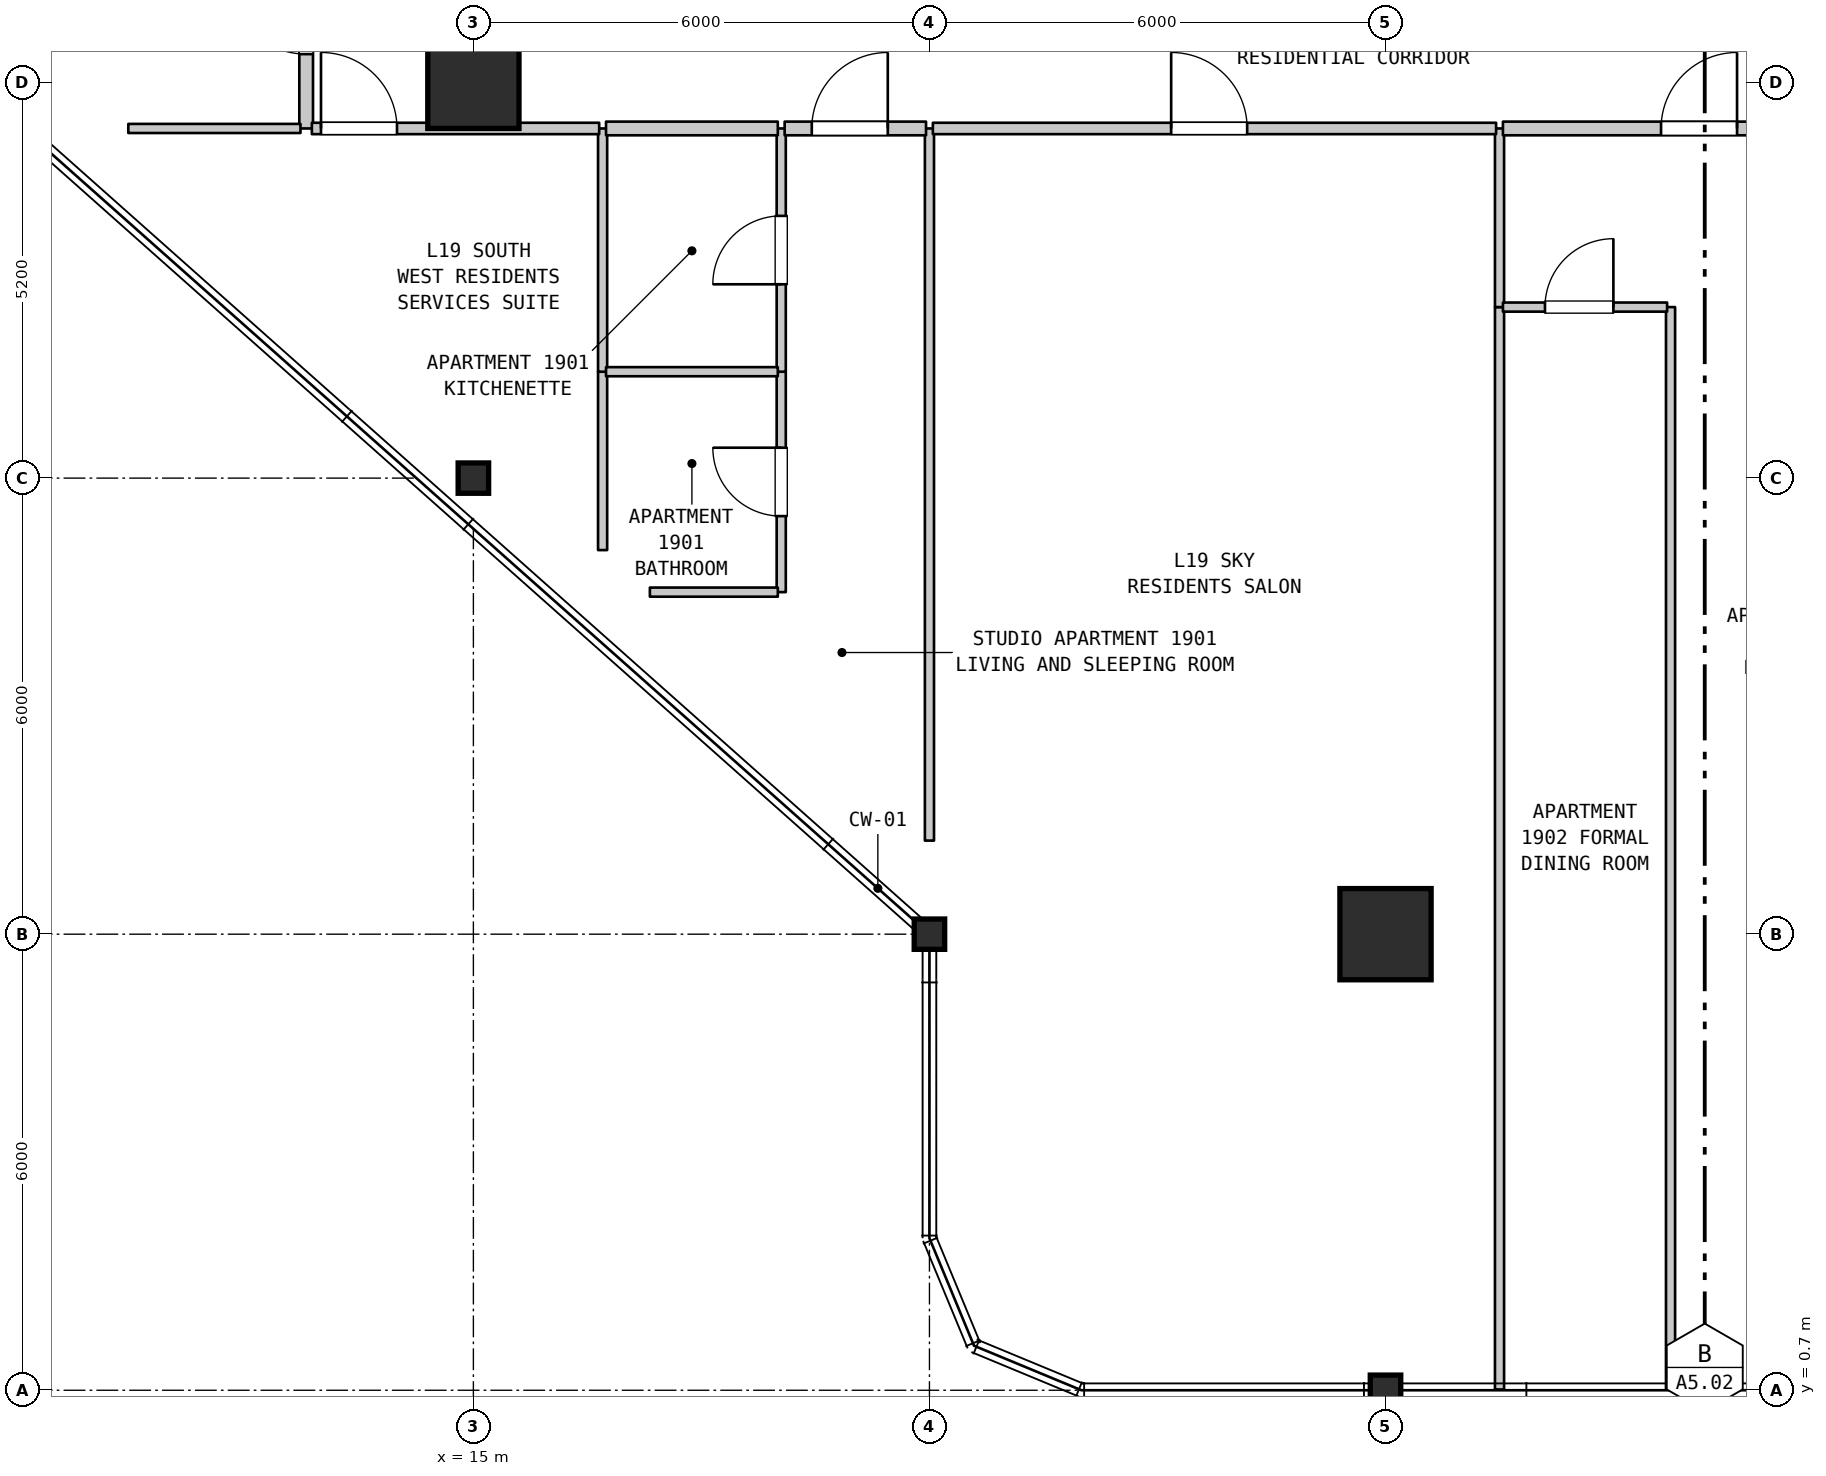
"""IFC4 building model, lengths in metres.
Left out: names, types, materials, properties, quantities, classifications, styles, units other than length and angle.
Written with IfcOpenShell. Run it as: python <this file> out.ifc"""

import sys

from ifc_helpers import new_model, si_unit, direction, frame, frame_2d, origin, origin_2d, place, context, subcontext, project, spatial, rectangle, i_section, extrude, element, fill, save


model = new_model("IFC4")
c1 = context("Model", 3, precision=1e-05, world=origin(), true_north=direction((0.0, 1.0)))
c2 = subcontext(c1, "Body", "Model", "MODEL_VIEW")
j1 = project(units=[si_unit("LENGTHUNIT", "METRE"), si_unit("PLANEANGLEUNIT", "RADIAN")], contexts=[c1])
p1 = place(None, origin())
s1 = spatial("IfcSite", under=j1, at=p1, CompositionType="ELEMENT")
p2 = place(p1, origin())
s2 = spatial("IfcBuilding", under=s1, at=p2, CompositionType="ELEMENT")
p3 = place(p2, frame((0.0, 0.0, 81.2)))
s3 = spatial("IfcBuildingStorey", under=s2, at=p3, CompositionType="ELEMENT", Elevation=81.2)
p4 = place(p3, frame((15.0, 12.7, 0.0), z_axis=(0.0, 0.0, 1.0), x_axis=(1.0, 0.0, 0.0)))
e1 = element("IfcColumn", 1, at=p4, inside=s3, PredefinedType="COLUMN", context=c2, shape_type="SweptSolid", body=[
    extrude(i_section(OverallWidth=0.401, OverallDepth=0.399, WebThickness=0.025, FlangeThickness=0.04, FilletRadius=0.015, at=origin_2d()), origin(), (0.0, 0.0, 1.0), 5.2),
])
p5 = place(p3, frame((15.0, 17.9, 0.0), z_axis=(0.0, 0.0, 1.0), x_axis=(1.0, 0.0, 0.0)))
e2 = element("IfcColumn", 2, at=p5, inside=s3, PredefinedType="COLUMN", context=c2, shape_type="SweptSolid", body=[
    extrude(rectangle(XDim=1.2, YDim=1.2, at=origin_2d()), origin(), (0.0, 0.0, 1.0), 5.2),
])
for number, where, z_axis, x_axis in (
    (3, (21.0, 6.7, 0.0), (0.0, 0.0, 1.0), (1.0, 0.0, 0.0)),
    (4, (27.0, 0.7, 0.0), (0.0, 0.0, 1.0), (1.0, 0.0, 0.0)),
):
    element("IfcColumn", number, at=place(p3, frame(where, z_axis=z_axis, x_axis=x_axis)), inside=s3, PredefinedType="COLUMN", context=c2, shape_type="SweptSolid", body=[
        extrude(i_section(OverallWidth=0.401, OverallDepth=0.399, WebThickness=0.025, FlangeThickness=0.04, FilletRadius=0.015, at=origin_2d()), origin(), (0.0, 0.0, 1.0), 5.2),
    ])
p6 = place(p3, frame((27.0, 6.7, 0.0), z_axis=(0.0, 0.0, 1.0), x_axis=(1.0, 0.0, 0.0)))
e5 = element("IfcColumn", 5, at=p6, inside=s3, PredefinedType="COLUMN", context=c2, shape_type="SweptSolid", body=[
    extrude(rectangle(XDim=1.2, YDim=1.2, at=origin_2d()), origin(), (0.0, 0.0, 1.0), 5.2),
])
p7 = place(p3, frame((12.8, 17.3, 0.0), z_axis=(0.0, 0.0, 1.0), x_axis=(0.0, 1.0, 0.0)))
e6 = element("IfcWall", 6, at=p7, inside=s3, PredefinedType="STANDARD", context=c2, shape_type="SweptSolid", body=[
    extrude(rectangle(XDim=3.1, YDim=0.18, at=frame_2d((1.55, 0.0))), origin(), (0.0, 0.0, 1.0), 4.885),
])
p8 = place(p7, frame((0.978, 0.0, 0.0)))
e7 = element("IfcOpeningElement", 7, at=p8, cuts=e6, PredefinedType="OPENING", context=c2, shape_type="SweptSolid", body=[
    extrude(rectangle(XDim=1.0, YDim=2.15, at=frame_2d((0.5, 1.075))), frame((0.0, 0.1, 0.0), z_axis=(0.0, -1.0, 0.0), x_axis=(1.0, 0.0, 0.0)), (0.0, 0.0, 1.0), 0.2),
])
p9 = place(p3, frame((16.7, 11.753, 0.0), z_axis=(0.0, 0.0, 1.0), x_axis=(0.0, 1.0, 0.0)))
e8 = element("IfcWall", 8, at=p9, inside=s3, PredefinedType="PARTITIONING", context=c2, shape_type="SweptSolid", body=[
    extrude(rectangle(XDim=2.347, YDim=0.12, at=frame_2d((1.174, 0.0))), origin(), (0.0, 0.0, 1.0), 4.885),
])
p10 = place(p3, frame((16.7, 14.1, 0.0), z_axis=(0.0, 0.0, 1.0), x_axis=(0.0, 1.0, 0.0)))
e9 = element("IfcWall", 9, at=p10, inside=s3, PredefinedType="PARTITIONING", context=c2, shape_type="SweptSolid", body=[
    extrude(rectangle(XDim=3.2, YDim=0.12, at=frame_2d((1.6, 0.0))), origin(), (0.0, 0.0, 1.0), 4.885),
])
p11 = place(p3, frame((19.05, 11.2, 0.0), z_axis=(0.0, 0.0, 1.0), x_axis=(0.0, 1.0, 0.0)))
e10 = element("IfcWall", 10, at=p11, inside=s3, PredefinedType="PARTITIONING", context=c2, shape_type="SweptSolid", body=[
    extrude(rectangle(XDim=2.9, YDim=0.12, at=frame_2d((1.45, 0.0))), origin(), (0.0, 0.0, 1.0), 4.885),
])
p12 = place(p11, frame((1.0, 0.0, 0.0)))
e11 = element("IfcOpeningElement", 11, at=p12, cuts=e10, PredefinedType="OPENING", context=c2, shape_type="SweptSolid", body=[
    extrude(rectangle(XDim=0.9, YDim=2.1, at=frame_2d((0.45, 1.05))), frame((0.0, 0.07, 0.0), z_axis=(0.0, -1.0, 0.0), x_axis=(1.0, 0.0, 0.0)), (0.0, 0.0, 1.0), 0.14),
])
p13 = place(p3, frame((19.05, 14.1, 0.0), z_axis=(0.0, 0.0, 1.0), x_axis=(0.0, 1.0, 0.0)))
e12 = element("IfcWall", 12, at=p13, inside=s3, PredefinedType="PARTITIONING", context=c2, shape_type="SweptSolid", body=[
    extrude(rectangle(XDim=3.2, YDim=0.12, at=frame_2d((1.6, 0.0))), origin(), (0.0, 0.0, 1.0), 4.885),
])
p14 = place(p13, frame((1.15, 0.0, 0.0)))
e13 = element("IfcOpeningElement", 13, at=p14, cuts=e12, PredefinedType="OPENING", context=c2, shape_type="SweptSolid", body=[
    extrude(rectangle(XDim=0.9, YDim=2.15, at=frame_2d((0.45, 1.075))), frame((0.0, 0.07, 0.0), z_axis=(0.0, -1.0, 0.0), x_axis=(1.0, 0.0, 0.0)), (0.0, 0.0, 1.0), 0.14),
])
p15 = place(p3, frame((21.0, 7.931, 0.0), z_axis=(0.0, 0.0, 1.0), x_axis=(0.0, 1.0, 0.0)))
e14 = element("IfcWall", 14, at=p15, inside=s3, PredefinedType="PARTITIONING", context=c2, shape_type="SweptSolid", body=[
    extrude(rectangle(XDim=9.369, YDim=0.12, at=frame_2d((4.685, 0.0))), origin(), (0.0, 0.0, 1.0), 4.885),
])
p16 = place(p3, frame((28.5, 0.71, 0.0), z_axis=(0.0, 0.0, 1.0), x_axis=(0.0, 1.0, 0.0)))
e15 = element("IfcWall", 15, at=p16, inside=s3, PredefinedType="PARTITIONING", context=c2, shape_type="SweptSolid", body=[
    extrude(rectangle(XDim=14.24, YDim=0.12, at=frame_2d((7.12, 0.0))), origin(), (0.0, 0.0, 1.0), 4.885),
])
p17 = place(p3, frame((28.5, 14.95, 0.0), z_axis=(0.0, 0.0, 1.0), x_axis=(0.0, 1.0, 0.0)))
e16 = element("IfcWall", 16, at=p17, inside=s3, PredefinedType="PARTITIONING", context=c2, shape_type="SweptSolid", body=[
    extrude(rectangle(XDim=2.35, YDim=0.12, at=frame_2d((1.175, 0.0))), origin(), (0.0, 0.0, 1.0), 4.885),
])
p18 = place(p3, frame((30.75, 0.71, 0.0), z_axis=(0.0, 0.0, 1.0), x_axis=(0.0, 1.0, 0.0)))
e17 = element("IfcWall", 17, at=p18, inside=s3, PredefinedType="PARTITIONING", context=c2, shape_type="SweptSolid", body=[
    extrude(rectangle(XDim=14.24, YDim=0.12, at=frame_2d((7.12, 0.0))), origin(), (0.0, 0.0, 1.0), 4.885),
])
p19 = place(p3, frame((17.322, 11.2, 0.0), z_axis=(0.0, 0.0, 1.0), x_axis=(1.0, 0.0, 0.0)))
e18 = element("IfcWall", 18, at=p19, inside=s3, PredefinedType="PARTITIONING", context=c2, shape_type="SweptSolid", body=[
    extrude(rectangle(XDim=1.683, YDim=0.12, at=frame_2d((0.841, 0.0))), origin(), (0.0, 0.0, 1.0), 4.885),
])
p20 = place(p3, frame((16.745, 14.1, 0.0), z_axis=(0.0, 0.0, 1.0), x_axis=(1.0, 0.0, 0.0)))
e19 = element("IfcWall", 19, at=p20, inside=s3, PredefinedType="PARTITIONING", context=c2, shape_type="SweptSolid", body=[
    extrude(rectangle(XDim=2.26, YDim=0.12, at=frame_2d((1.13, 0.0))), origin(), (0.0, 0.0, 1.0), 4.885),
])
p21 = place(p3, frame((28.545, 14.95, 0.0), z_axis=(0.0, 0.0, 1.0), x_axis=(1.0, 0.0, 0.0)))
e20 = element("IfcWall", 20, at=p21, inside=s3, PredefinedType="PARTITIONING", context=c2, shape_type="SweptSolid", body=[
    extrude(rectangle(XDim=2.16, YDim=0.12, at=frame_2d((1.08, 0.0))), origin(), (0.0, 0.0, 1.0), 4.885),
])
p22 = place(p21, frame((0.553, 0.0, 0.0)))
e21 = element("IfcOpeningElement", 21, at=p22, cuts=e20, PredefinedType="OPENING", context=c2, shape_type="SweptSolid", body=[
    extrude(rectangle(XDim=0.9, YDim=2.15, at=frame_2d((0.45, 1.075))), frame((0.0, 0.07, 0.0), z_axis=(0.0, -1.0, 0.0), x_axis=(1.0, 0.0, 0.0)), (0.0, 0.0, 1.0), 0.14),
])
p23 = place(p3, frame((10.46, 17.3, 0.0), z_axis=(0.0, 0.0, 1.0), x_axis=(1.0, 0.0, 0.0)))
e22 = element("IfcWall", 22, at=p23, inside=s3, PredefinedType="PARTITIONING", context=c2, shape_type="SweptSolid", body=[
    extrude(rectangle(XDim=2.265, YDim=0.12, at=frame_2d((1.133, 0.0))), origin(), (0.0, 0.0, 1.0), 4.885),
])
p24 = place(p3, frame((12.875, 17.3, 0.0), z_axis=(0.0, 0.0, 1.0), x_axis=(1.0, 0.0, 0.0)))
e23 = element("IfcWall", 23, at=p24, inside=s3, PredefinedType="STANDARD", context=c2, shape_type="SweptSolid", body=[
    extrude(rectangle(XDim=3.78, YDim=0.15, at=frame_2d((1.89, 0.0))), origin(), (0.0, 0.0, 1.0), 4.885),
])
p25 = place(p24, frame((0.12, 0.0, 0.0)))
e24 = element("IfcOpeningElement", 24, at=p25, cuts=e23, PredefinedType="OPENING", context=c2, shape_type="SweptSolid", body=[
    extrude(rectangle(XDim=1.0, YDim=2.15, at=frame_2d((0.5, 1.075))), frame((0.0, 0.085, 0.0), z_axis=(0.0, -1.0, 0.0), x_axis=(1.0, 0.0, 0.0)), (0.0, 0.0, 1.0), 0.17),
])
p26 = place(p3, frame((16.745, 17.3, 0.0), z_axis=(0.0, 0.0, 1.0), x_axis=(1.0, 0.0, 0.0)))
e25 = element("IfcWall", 25, at=p26, inside=s3, PredefinedType="STANDARD", context=c2, shape_type="SweptSolid", body=[
    extrude(rectangle(XDim=2.26, YDim=0.18, at=frame_2d((1.13, 0.0))), origin(), (0.0, 0.0, 1.0), 4.885),
])
p27 = place(p3, frame((19.095, 17.3, 0.0), z_axis=(0.0, 0.0, 1.0), x_axis=(1.0, 0.0, 0.0)))
e26 = element("IfcWall", 26, at=p27, inside=s3, PredefinedType="STANDARD", context=c2, shape_type="SweptSolid", body=[
    extrude(rectangle(XDim=1.86, YDim=0.18, at=frame_2d((0.93, 0.0))), origin(), (0.0, 0.0, 1.0), 4.885),
])
p28 = place(p27, frame((0.357, 0.0, 0.0)))
e27 = element("IfcOpeningElement", 27, at=p28, cuts=e26, PredefinedType="OPENING", context=c2, shape_type="SweptSolid", body=[
    extrude(rectangle(XDim=1.0, YDim=2.15, at=frame_2d((0.5, 1.075))), frame((0.0, 0.1, 0.0), z_axis=(0.0, -1.0, 0.0), x_axis=(1.0, 0.0, 0.0)), (0.0, 0.0, 1.0), 0.2),
])
p29 = place(p3, frame((21.045, 17.3, 0.0), z_axis=(0.0, 0.0, 1.0), x_axis=(1.0, 0.0, 0.0)))
e28 = element("IfcWall", 28, at=p29, inside=s3, PredefinedType="STANDARD", context=c2, shape_type="SweptSolid", body=[
    extrude(rectangle(XDim=7.41, YDim=0.15, at=frame_2d((3.705, 0.0))), origin(), (0.0, 0.0, 1.0), 4.885),
])
p30 = place(p29, frame((3.135, 0.0, 0.0)))
e29 = element("IfcOpeningElement", 29, at=p30, cuts=e28, PredefinedType="OPENING", context=c2, shape_type="SweptSolid", body=[
    extrude(rectangle(XDim=1.0, YDim=2.15, at=frame_2d((0.5, 1.075))), frame((0.0, 0.085, 0.0), z_axis=(0.0, -1.0, 0.0), x_axis=(1.0, 0.0, 0.0)), (0.0, 0.0, 1.0), 0.17),
])
p31 = place(p3, frame((28.545, 17.3, 0.0), z_axis=(0.0, 0.0, 1.0), x_axis=(1.0, 0.0, 0.0)))
e30 = element("IfcWall", 30, at=p31, inside=s3, PredefinedType="STANDARD", context=c2, shape_type="SweptSolid", body=[
    extrude(rectangle(XDim=5.095, YDim=0.18, at=frame_2d((2.547, 0.0))), origin(), (0.0, 0.0, 1.0), 4.885),
])
p32 = place(p31, frame((2.08, 0.0, 0.0)))
e31 = element("IfcOpeningElement", 31, at=p32, cuts=e30, PredefinedType="OPENING", context=c2, shape_type="SweptSolid", body=[
    extrude(rectangle(XDim=1.0, YDim=2.15, at=frame_2d((0.5, 1.075))), frame((0.0, 0.1, 0.0), z_axis=(0.0, -1.0, 0.0), x_axis=(1.0, 0.0, 0.0)), (0.0, 0.0, 1.0), 0.2),
])
p33 = place(p8, origin())
e32 = element("IfcDoor", 32, at=p33, inside=s3, OperationType="SINGLE_SWING_RIGHT", PredefinedType="DOOR", context=c2, shape_type="SweptSolid", body=[
    extrude(rectangle(XDim=1.0, YDim=2.15, at=frame_2d((0.5, 1.075))), frame((0.0, 0.025, 0.0), z_axis=(0.0, -1.0, 0.0), x_axis=(1.0, 0.0, 0.0)), (0.0, 0.0, 1.0), 0.05),
])
fill(e7, e32)
p34 = place(p12, origin())
e33 = element("IfcDoor", 33, at=p34, inside=s3, OperationType="SINGLE_SWING_RIGHT", PredefinedType="DOOR", context=c2, shape_type="SweptSolid", body=[
    extrude(rectangle(XDim=0.9, YDim=2.1, at=frame_2d((0.45, 1.05))), frame((0.0, 0.025, 0.0), z_axis=(0.0, -1.0, 0.0), x_axis=(1.0, 0.0, 0.0)), (0.0, 0.0, 1.0), 0.05),
])
fill(e11, e33)
p35 = place(p14, origin())
e34 = element("IfcDoor", 34, at=p35, inside=s3, OperationType="SINGLE_SWING_LEFT", PredefinedType="DOOR", context=c2, shape_type="SweptSolid", body=[
    extrude(rectangle(XDim=0.9, YDim=2.15, at=frame_2d((0.45, 1.075))), frame((0.0, 0.025, 0.0), z_axis=(0.0, -1.0, 0.0), x_axis=(1.0, 0.0, 0.0)), (0.0, 0.0, 1.0), 0.05),
])
fill(e13, e34)
p36 = place(p22, origin())
e35 = element("IfcDoor", 35, at=p36, inside=s3, OperationType="SINGLE_SWING_RIGHT", PredefinedType="DOOR", context=c2, shape_type="SweptSolid", body=[
    extrude(rectangle(XDim=0.9, YDim=2.15, at=frame_2d((0.45, 1.075))), frame((0.0, 0.025, 0.0), z_axis=(0.0, -1.0, 0.0), x_axis=(1.0, 0.0, 0.0)), (0.0, 0.0, 1.0), 0.05),
])
fill(e21, e35)
p37 = place(p25, origin())
e36 = element("IfcDoor", 36, at=p37, inside=s3, OperationType="SINGLE_SWING_LEFT", PredefinedType="DOOR", context=c2, shape_type="SweptSolid", body=[
    extrude(rectangle(XDim=1.0, YDim=2.15, at=frame_2d((0.5, 1.075))), frame((0.0, 0.025, 0.0), z_axis=(0.0, -1.0, 0.0), x_axis=(1.0, 0.0, 0.0)), (0.0, 0.0, 1.0), 0.05),
])
fill(e24, e36)
p38 = place(p28, origin())
e37 = element("IfcDoor", 37, at=p38, inside=s3, OperationType="SINGLE_SWING_RIGHT", PredefinedType="DOOR", context=c2, shape_type="SweptSolid", body=[
    extrude(rectangle(XDim=1.0, YDim=2.15, at=frame_2d((0.5, 1.075))), frame((0.0, 0.025, 0.0), z_axis=(0.0, -1.0, 0.0), x_axis=(1.0, 0.0, 0.0)), (0.0, 0.0, 1.0), 0.05),
])
fill(e27, e37)
p39 = place(p30, origin())
e38 = element("IfcDoor", 38, at=p39, inside=s3, OperationType="SINGLE_SWING_LEFT", PredefinedType="DOOR", context=c2, shape_type="SweptSolid", body=[
    extrude(rectangle(XDim=1.0, YDim=2.15, at=frame_2d((0.5, 1.075))), frame((0.0, 0.025, 0.0), z_axis=(0.0, -1.0, 0.0), x_axis=(1.0, 0.0, 0.0)), (0.0, 0.0, 1.0), 0.05),
])
fill(e29, e38)
p40 = place(p32, origin())
e39 = element("IfcDoor", 39, at=p40, inside=s3, OperationType="SINGLE_SWING_RIGHT", PredefinedType="DOOR", context=c2, shape_type="SweptSolid", body=[
    extrude(rectangle(XDim=1.0, YDim=2.15, at=frame_2d((0.5, 1.075))), frame((0.0, 0.025, 0.0), z_axis=(0.0, -1.0, 0.0), x_axis=(1.0, 0.0, 0.0)), (0.0, 0.0, 1.0), 0.05),
])
fill(e31, e39)
save(model, sys.argv[1])
